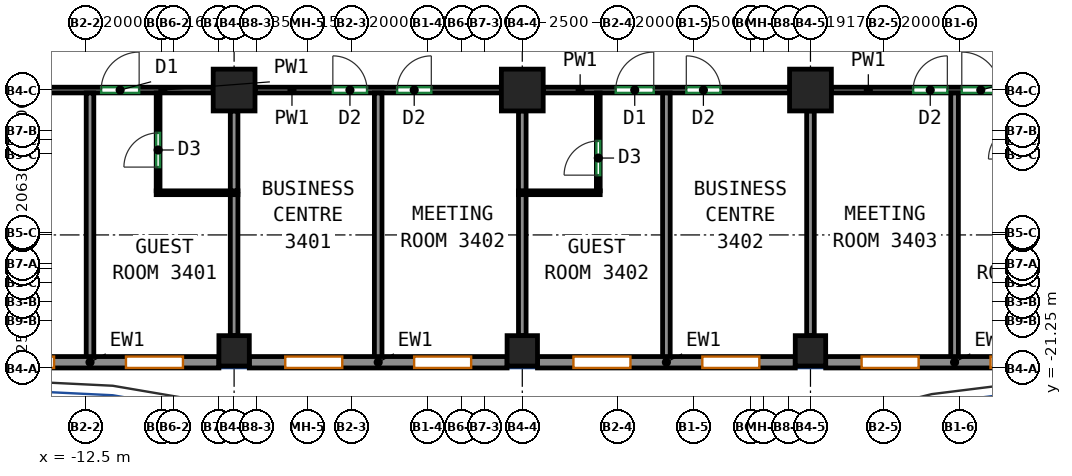
"""IFC4 building model, lengths in metres.
Left out: names, types, materials, properties, quantities, classifications, styles, units other than length and angle.
Written with IfcOpenShell. Run it as: python <this file> out.ifc"""

import sys

from ifc_helpers import new_model, si_unit, direction, frame, frame_2d, origin, origin_2d, place, context, subcontext, project, spatial, rectangle, extrude, source, transform, mapped, element, fill, save


model = new_model("IFC4")
c1 = context("Model", 3, precision=1e-05, world=origin(), true_north=direction((0.0, 1.0)))
c2 = subcontext(c1, "Body", "Model", "MODEL_VIEW")
j1 = project(units=[si_unit("LENGTHUNIT", "METRE"), si_unit("PLANEANGLEUNIT", "RADIAN")], contexts=[c1])
p1 = place(None, origin())
s1 = spatial("IfcSite", under=j1, at=p1, CompositionType="ELEMENT")
p2 = place(p1, origin())
s2 = spatial("IfcBuilding", under=s1, at=p2, CompositionType="ELEMENT")
p3 = place(p2, frame((0.0, 0.0, 150.7)))
s3 = spatial("IfcBuildingStorey", under=s2, at=p3, CompositionType="ELEMENT", Elevation=150.7)
m1 = source(origin(), c2, "Body", "SweptSolid", [
    extrude(rectangle(XDim=0.8, YDim=0.8, at=origin_2d()), origin(), (0.0, 0.0, 1.0), 3.12),
])
p4 = place(p3, frame((-8.583, -20.8, 0.0), z_axis=(0.0, 0.0, 1.0), x_axis=(1.0, 0.0, 0.0)))
e1 = element("IfcColumn", 1, at=p4, inside=s3, PredefinedType="COLUMN", context=c2, shape_type="MappedRepresentation", body=[
    mapped(m1, transform((0.0, 0.0, 0.0))),
])
m2 = source(origin(), c2, "Body", "SweptSolid", [
    extrude(rectangle(XDim=1.1, YDim=1.1, at=origin_2d()), origin(), (0.0, 0.0, 1.0), 3.12),
])
p5 = place(p3, frame((-8.583, -13.938, 0.0), z_axis=(0.0, 0.0, 1.0), x_axis=(1.0, 0.0, 0.0)))
e2 = element("IfcColumn", 2, at=p5, inside=s3, PredefinedType="COLUMN", context=c2, shape_type="MappedRepresentation", body=[
    mapped(m2, transform((0.0, 0.0, 0.0))),
])
p6 = place(p3, frame((-1.0, -20.8, 0.0), z_axis=(0.0, 0.0, 1.0), x_axis=(1.0, 0.0, 0.0)))
e3 = element("IfcColumn", 3, at=p6, inside=s3, PredefinedType="COLUMN", context=c2, shape_type="MappedRepresentation", body=[
    mapped(m1, transform((0.0, 0.0, 0.0))),
])
p7 = place(p3, frame((-1.0, -13.938, 0.0), z_axis=(0.0, 0.0, 1.0), x_axis=(1.0, 0.0, 0.0)))
e4 = element("IfcColumn", 4, at=p7, inside=s3, PredefinedType="COLUMN", context=c2, shape_type="MappedRepresentation", body=[
    mapped(m2, transform((0.0, 0.0, 0.0))),
])
p8 = place(p3, frame((6.583, -20.8, 0.0), z_axis=(0.0, 0.0, 1.0), x_axis=(1.0, 0.0, 0.0)))
e5 = element("IfcColumn", 5, at=p8, inside=s3, PredefinedType="COLUMN", context=c2, shape_type="MappedRepresentation", body=[
    mapped(m1, transform((0.0, 0.0, 0.0))),
])
p9 = place(p3, frame((6.583, -13.938, 0.0), z_axis=(0.0, 0.0, 1.0), x_axis=(1.0, 0.0, 0.0)))
e6 = element("IfcColumn", 6, at=p9, inside=s3, PredefinedType="COLUMN", context=c2, shape_type="MappedRepresentation", body=[
    mapped(m2, transform((0.0, 0.0, 0.0))),
])
m3 = source(origin(), c2, "Body", "SweptSolid", [
    extrude(rectangle(XDim=6.783, YDim=0.3, at=frame_2d((3.392, 0.0))), origin(), (0.0, 0.0, 1.0), 3.12),
])
p10 = place(p3, frame((-15.767, -21.1, 0.0), z_axis=(0.0, 0.0, 1.0), x_axis=(1.0, 0.0, 0.0)))
e7 = element("IfcWall", 7, at=p10, inside=s3, PredefinedType="SOLIDWALL", context=c2, shape_type="MappedRepresentation", body=[
    mapped(m3, transform((0.0, 0.0, 0.0))),
])
p11 = place(p10, frame((0.946, 0.0, 0.85)))
e8 = element("IfcOpeningElement", 8, at=p11, cuts=e7, PredefinedType="OPENING", context=c2, shape_type="SweptSolid", body=[
    extrude(rectangle(XDim=1.5, YDim=1.95, at=frame_2d((0.75, 0.975))), frame((0.0, 0.16, 0.0), z_axis=(0.0, -1.0, 0.0), x_axis=(1.0, 0.0, 0.0)), (0.0, 0.0, 1.0), 0.32),
])
p12 = place(p10, frame((4.338, 0.0, 0.85)))
e9 = element("IfcOpeningElement", 9, at=p12, cuts=e7, PredefinedType="OPENING", context=c2, shape_type="SweptSolid", body=[
    extrude(rectangle(XDim=1.5, YDim=1.95, at=frame_2d((0.75, 0.975))), frame((0.0, 0.16, 0.0), z_axis=(0.0, -1.0, 0.0), x_axis=(1.0, 0.0, 0.0)), (0.0, 0.0, 1.0), 0.32),
])
m4 = source(origin(), c2, "Body", "SweptSolid", [
    extrude(rectangle(XDim=6.783, YDim=0.3, at=frame_2d((3.392, 0.0))), origin(), (0.0, 0.0, 1.0), 3.12),
])
p13 = place(p3, frame((-8.183, -21.1, 0.0), z_axis=(0.0, 0.0, 1.0), x_axis=(1.0, 0.0, 0.0)))
e10 = element("IfcWall", 10, at=p13, inside=s3, PredefinedType="SOLIDWALL", context=c2, shape_type="MappedRepresentation", body=[
    mapped(m4, transform((0.0, 0.0, 0.0))),
])
p14 = place(p13, frame((0.946, 0.0, 0.85)))
e11 = element("IfcOpeningElement", 11, at=p14, cuts=e10, PredefinedType="OPENING", context=c2, shape_type="SweptSolid", body=[
    extrude(rectangle(XDim=1.5, YDim=1.95, at=frame_2d((0.75, 0.975))), frame((0.0, 0.16, 0.0), z_axis=(0.0, -1.0, 0.0), x_axis=(1.0, 0.0, 0.0)), (0.0, 0.0, 1.0), 0.32),
])
p15 = place(p13, frame((4.337, 0.0, 0.85)))
e12 = element("IfcOpeningElement", 12, at=p15, cuts=e10, PredefinedType="OPENING", context=c2, shape_type="SweptSolid", body=[
    extrude(rectangle(XDim=1.5, YDim=1.95, at=frame_2d((0.75, 0.975))), frame((0.0, 0.16, 0.0), z_axis=(0.0, -1.0, 0.0), x_axis=(1.0, 0.0, 0.0)), (0.0, 0.0, 1.0), 0.32),
])
p16 = place(p3, frame((-0.6, -21.1, 0.0), z_axis=(0.0, 0.0, 1.0), x_axis=(1.0, 0.0, 0.0)))
e13 = element("IfcWall", 13, at=p16, inside=s3, PredefinedType="SOLIDWALL", context=c2, shape_type="MappedRepresentation", body=[
    mapped(m4, transform((0.0, 0.0, 0.0))),
])
p17 = place(p16, frame((0.946, 0.0, 0.85)))
e14 = element("IfcOpeningElement", 14, at=p17, cuts=e13, PredefinedType="OPENING", context=c2, shape_type="SweptSolid", body=[
    extrude(rectangle(XDim=1.5, YDim=1.95, at=frame_2d((0.75, 0.975))), frame((0.0, 0.16, 0.0), z_axis=(0.0, -1.0, 0.0), x_axis=(1.0, 0.0, 0.0)), (0.0, 0.0, 1.0), 0.32),
])
p18 = place(p16, frame((4.337, 0.0, 0.85)))
e15 = element("IfcOpeningElement", 15, at=p18, cuts=e13, PredefinedType="OPENING", context=c2, shape_type="SweptSolid", body=[
    extrude(rectangle(XDim=1.5, YDim=1.95, at=frame_2d((0.75, 0.975))), frame((0.0, 0.16, 0.0), z_axis=(0.0, -1.0, 0.0), x_axis=(1.0, 0.0, 0.0)), (0.0, 0.0, 1.0), 0.32),
])
p19 = place(p3, frame((6.983, -21.1, 0.0), z_axis=(0.0, 0.0, 1.0), x_axis=(1.0, 0.0, 0.0)))
e16 = element("IfcWall", 16, at=p19, inside=s3, PredefinedType="SOLIDWALL", context=c2, shape_type="MappedRepresentation", body=[
    mapped(m3, transform((0.0, 0.0, 0.0))),
])
p20 = place(p19, frame((0.946, 0.0, 0.85)))
e17 = element("IfcOpeningElement", 17, at=p20, cuts=e16, PredefinedType="OPENING", context=c2, shape_type="SweptSolid", body=[
    extrude(rectangle(XDim=1.5, YDim=1.95, at=frame_2d((0.75, 0.975))), frame((0.0, 0.16, 0.0), z_axis=(0.0, -1.0, 0.0), x_axis=(1.0, 0.0, 0.0)), (0.0, 0.0, 1.0), 0.32),
])
p21 = place(p19, frame((4.338, 0.0, 0.85)))
e18 = element("IfcOpeningElement", 18, at=p21, cuts=e16, PredefinedType="OPENING", context=c2, shape_type="SweptSolid", body=[
    extrude(rectangle(XDim=1.5, YDim=1.95, at=frame_2d((0.75, 0.975))), frame((0.0, 0.16, 0.0), z_axis=(0.0, -1.0, 0.0), x_axis=(1.0, 0.0, 0.0)), (0.0, 0.0, 1.0), 0.32),
])
p22 = place(p3, frame((-13.55, -13.938, 0.0), z_axis=(0.0, 0.0, 1.0), x_axis=(1.0, 0.0, 0.0)))
e19 = element("IfcWall", 19, at=p22, inside=s3, PredefinedType="PARTITIONING", context=c2, shape_type="SweptSolid", body=[
    extrude(rectangle(XDim=4.417, YDim=0.15, at=frame_2d((2.208, 0.0))), origin(), (0.0, 0.0, 1.0), 3.12),
])
p23 = place(p22, frame((1.468, 0.0, 0.0)))
e20 = element("IfcOpeningElement", 20, at=p23, cuts=e19, PredefinedType="OPENING", context=c2, shape_type="SweptSolid", body=[
    extrude(rectangle(XDim=1.0, YDim=2.1, at=frame_2d((0.5, 1.05))), frame((0.0, 0.085, 0.0), z_axis=(0.0, -1.0, 0.0), x_axis=(1.0, 0.0, 0.0)), (0.0, 0.0, 1.0), 0.17),
])
p24 = place(p3, frame((-8.033, -13.938, 0.0), z_axis=(0.0, 0.0, 1.0), x_axis=(1.0, 0.0, 0.0)))
e21 = element("IfcWall", 21, at=p24, inside=s3, PredefinedType="PARTITIONING", context=c2, shape_type="SweptSolid", body=[
    extrude(rectangle(XDim=6.483, YDim=0.15, at=frame_2d((3.241, 0.0))), origin(), (0.0, 0.0, 1.0), 3.12),
])
p25 = place(p24, frame((2.048, 0.0, 0.0)))
e22 = element("IfcOpeningElement", 22, at=p25, cuts=e21, PredefinedType="OPENING", context=c2, shape_type="SweptSolid", body=[
    extrude(rectangle(XDim=0.9, YDim=2.1, at=frame_2d((0.45, 1.05))), frame((0.0, 0.085, 0.0), z_axis=(0.0, -1.0, 0.0), x_axis=(1.0, 0.0, 0.0)), (0.0, 0.0, 1.0), 0.17),
])
p26 = place(p24, frame((3.739, 0.0, 0.0)))
e23 = element("IfcOpeningElement", 23, at=p26, cuts=e21, PredefinedType="OPENING", context=c2, shape_type="SweptSolid", body=[
    extrude(rectangle(XDim=0.9, YDim=2.1, at=frame_2d((0.45, 1.05))), frame((0.0, 0.085, 0.0), z_axis=(0.0, -1.0, 0.0), x_axis=(1.0, 0.0, 0.0)), (0.0, 0.0, 1.0), 0.17),
])
p27 = place(p3, frame((-0.45, -13.938, 0.0), z_axis=(0.0, 0.0, 1.0), x_axis=(1.0, 0.0, 0.0)))
e24 = element("IfcWall", 24, at=p27, inside=s3, PredefinedType="PARTITIONING", context=c2, shape_type="SweptSolid", body=[
    extrude(rectangle(XDim=6.483, YDim=0.15, at=frame_2d((3.241, 0.0))), origin(), (0.0, 0.0, 1.0), 3.12),
])
p28 = place(p27, frame((1.909, 0.0, 0.0)))
e25 = element("IfcOpeningElement", 25, at=p28, cuts=e24, PredefinedType="OPENING", context=c2, shape_type="SweptSolid", body=[
    extrude(rectangle(XDim=1.0, YDim=2.1, at=frame_2d((0.5, 1.05))), frame((0.0, 0.085, 0.0), z_axis=(0.0, -1.0, 0.0), x_axis=(1.0, 0.0, 0.0)), (0.0, 0.0, 1.0), 0.17),
])
p29 = place(p27, frame((3.766, 0.0, 0.0)))
e26 = element("IfcOpeningElement", 26, at=p29, cuts=e24, PredefinedType="OPENING", context=c2, shape_type="SweptSolid", body=[
    extrude(rectangle(XDim=0.9, YDim=2.1, at=frame_2d((0.45, 1.05))), frame((0.0, 0.085, 0.0), z_axis=(0.0, -1.0, 0.0), x_axis=(1.0, 0.0, 0.0)), (0.0, 0.0, 1.0), 0.17),
])
p30 = place(p3, frame((7.133, -13.938, 0.0), z_axis=(0.0, 0.0, 1.0), x_axis=(1.0, 0.0, 0.0)))
e27 = element("IfcWall", 27, at=p30, inside=s3, PredefinedType="PARTITIONING", context=c2, shape_type="SweptSolid", body=[
    extrude(rectangle(XDim=6.484, YDim=0.15, at=frame_2d((3.242, 0.0))), origin(), (0.0, 0.0, 1.0), 3.12),
])
p31 = place(p30, frame((2.152, 0.0, 0.0)))
e28 = element("IfcOpeningElement", 28, at=p31, cuts=e27, PredefinedType="OPENING", context=c2, shape_type="SweptSolid", body=[
    extrude(rectangle(XDim=0.9, YDim=2.1, at=frame_2d((0.45, 1.05))), frame((0.0, 0.085, 0.0), z_axis=(0.0, -1.0, 0.0), x_axis=(1.0, 0.0, 0.0)), (0.0, 0.0, 1.0), 0.17),
])
p32 = place(p30, frame((3.432, 0.0, 0.0)))
e29 = element("IfcOpeningElement", 29, at=p32, cuts=e27, PredefinedType="OPENING", context=c2, shape_type="SweptSolid", body=[
    extrude(rectangle(XDim=1.0, YDim=2.1, at=frame_2d((0.5, 1.05))), frame((0.0, 0.085, 0.0), z_axis=(0.0, -1.0, 0.0), x_axis=(1.0, 0.0, 0.0)), (0.0, 0.0, 1.0), 0.17),
])
p33 = place(p3, frame((-12.375, -21.0, 0.0), z_axis=(0.0, 0.0, 1.0), x_axis=(0.0, 1.0, 0.0)))
e30 = element("IfcWall", 30, at=p33, inside=s3, PredefinedType="PARTITIONING", context=c2, shape_type="SweptSolid", body=[
    extrude(rectangle(XDim=6.985, YDim=0.2, at=frame_2d((3.493, 0.0))), origin(), (0.0, 0.0, 1.0), 3.12),
])
p34 = place(p3, frame((-10.583, -16.59, 0.0), z_axis=(0.0, 0.0, 1.0), x_axis=(0.0, 1.0, 0.0)))
e31 = element("IfcWall", 31, at=p34, inside=s3, PredefinedType="PARTITIONING", context=c2, shape_type="SweptSolid", body=[
    extrude(rectangle(XDim=2.575, YDim=0.1, at=frame_2d((1.288, 0.0))), origin(), (0.0, 0.0, 1.0), 3.12),
])
p35 = place(p34, frame((0.625, 0.0, 0.0)))
e32 = element("IfcOpeningElement", 32, at=p35, cuts=e31, PredefinedType="OPENING", context=c2, shape_type="SweptSolid", body=[
    extrude(rectangle(XDim=0.9, YDim=2.1, at=frame_2d((0.45, 1.05))), frame((0.0, 0.06, 0.0), z_axis=(0.0, -1.0, 0.0), x_axis=(1.0, 0.0, 0.0)), (0.0, 0.0, 1.0), 0.12),
])
p36 = place(p3, frame((-10.633, -16.64, 0.0), z_axis=(0.0, 0.0, 1.0), x_axis=(1.0, 0.0, 0.0)))
e33 = element("IfcWall", 33, at=p36, inside=s3, PredefinedType="PARTITIONING", context=c2, shape_type="SweptSolid", body=[
    extrude(rectangle(XDim=2.15, YDim=0.1, at=frame_2d((1.075, 0.0))), origin(), (0.0, 0.0, 1.0), 3.12),
])
p37 = place(p3, frame((-8.583, -20.4, 0.0), z_axis=(0.0, 0.0, 1.0), x_axis=(0.0, 1.0, 0.0)))
e34 = element("IfcWall", 34, at=p37, inside=s3, PredefinedType="PARTITIONING", context=c2, shape_type="SweptSolid", body=[
    extrude(rectangle(XDim=3.71, YDim=0.2, at=frame_2d((1.855, 0.0))), origin(), (0.0, 0.0, 1.0), 3.12),
])
p38 = place(p3, frame((-8.583, -16.59, 0.0), z_axis=(0.0, 0.0, 1.0), x_axis=(0.0, 1.0, 0.0)))
e35 = element("IfcWall", 35, at=p38, inside=s3, PredefinedType="PARTITIONING", context=c2, shape_type="SweptSolid", body=[
    extrude(rectangle(XDim=2.102, YDim=0.2, at=frame_2d((1.051, 0.0))), origin(), (0.0, 0.0, 1.0), 3.12),
])
p39 = place(p3, frame((-4.792, -21.0, 0.0), z_axis=(0.0, 0.0, 1.0), x_axis=(0.0, 1.0, 0.0)))
e36 = element("IfcWall", 36, at=p39, inside=s3, PredefinedType="PARTITIONING", context=c2, shape_type="SweptSolid", body=[
    extrude(rectangle(XDim=6.985, YDim=0.2, at=frame_2d((3.493, 0.0))), origin(), (0.0, 0.0, 1.0), 3.12),
])
p40 = place(p3, frame((-1.0, -20.4, 0.0), z_axis=(0.0, 0.0, 1.0), x_axis=(0.0, 1.0, 0.0)))
e37 = element("IfcWall", 37, at=p40, inside=s3, PredefinedType="PARTITIONING", context=c2, shape_type="SweptSolid", body=[
    extrude(rectangle(XDim=3.72, YDim=0.2, at=frame_2d((1.86, 0.0))), origin(), (0.0, 0.0, 1.0), 3.12),
])
p41 = place(p3, frame((-1.0, -16.6, 0.0), z_axis=(0.0, 0.0, 1.0), x_axis=(0.0, 1.0, 0.0)))
e38 = element("IfcWall", 38, at=p41, inside=s3, PredefinedType="PARTITIONING", context=c2, shape_type="SweptSolid", body=[
    extrude(rectangle(XDim=2.112, YDim=0.2, at=frame_2d((1.056, 0.0))), origin(), (0.0, 0.0, 1.0), 3.12),
])
p42 = place(p3, frame((1.0, -16.59, 0.0), z_axis=(0.0, 0.0, 1.0), x_axis=(0.0, 1.0, 0.0)))
e39 = element("IfcWall", 39, at=p42, inside=s3, PredefinedType="PARTITIONING", context=c2, shape_type="SweptSolid", body=[
    extrude(rectangle(XDim=2.575, YDim=0.1, at=frame_2d((1.288, 0.0))), origin(), (0.0, 0.0, 1.0), 3.12),
])
p43 = place(p42, frame((0.413, 0.0, 0.0)))
e40 = element("IfcOpeningElement", 40, at=p43, cuts=e39, PredefinedType="OPENING", context=c2, shape_type="SweptSolid", body=[
    extrude(rectangle(XDim=0.9, YDim=2.1, at=frame_2d((0.45, 1.05))), frame((0.0, 0.06, 0.0), z_axis=(0.0, -1.0, 0.0), x_axis=(1.0, 0.0, 0.0)), (0.0, 0.0, 1.0), 0.12),
])
p44 = place(p3, frame((-1.1, -16.64, 0.0), z_axis=(0.0, 0.0, 1.0), x_axis=(1.0, 0.0, 0.0)))
e41 = element("IfcWall", 41, at=p44, inside=s3, PredefinedType="PARTITIONING", context=c2, shape_type="SweptSolid", body=[
    extrude(rectangle(XDim=2.15, YDim=0.1, at=frame_2d((1.075, 0.0))), origin(), (0.0, 0.0, 1.0), 3.12),
])
p45 = place(p3, frame((2.792, -21.0, 0.0), z_axis=(0.0, 0.0, 1.0), x_axis=(0.0, 1.0, 0.0)))
e42 = element("IfcWall", 42, at=p45, inside=s3, PredefinedType="PARTITIONING", context=c2, shape_type="SweptSolid", body=[
    extrude(rectangle(XDim=6.985, YDim=0.2, at=frame_2d((3.493, 0.0))), origin(), (0.0, 0.0, 1.0), 3.12),
])
p46 = place(p3, frame((6.583, -20.4, 0.0), z_axis=(0.0, 0.0, 1.0), x_axis=(0.0, 1.0, 0.0)))
e43 = element("IfcWall", 43, at=p46, inside=s3, PredefinedType="PARTITIONING", context=c2, shape_type="SweptSolid", body=[
    extrude(rectangle(XDim=5.912, YDim=0.2, at=frame_2d((2.956, 0.0))), origin(), (0.0, 0.0, 1.0), 3.12),
])
p47 = place(p3, frame((10.375, -21.0, 0.0), z_axis=(0.0, 0.0, 1.0), x_axis=(0.0, 1.0, 0.0)))
e44 = element("IfcWall", 44, at=p47, inside=s3, PredefinedType="PARTITIONING", context=c2, shape_type="SweptSolid", body=[
    extrude(rectangle(XDim=6.985, YDim=0.2, at=frame_2d((3.493, 0.0))), origin(), (0.0, 0.0, 1.0), 3.12),
])
p48 = place(p11, origin())
e45 = element("IfcWindow", 45, at=p48, inside=s3, PartitioningType="SINGLE_PANEL", PredefinedType="WINDOW", context=c2, shape_type="SweptSolid", body=[
    extrude(rectangle(XDim=1.5, YDim=1.95, at=frame_2d((0.75, 0.975))), frame((0.0, 0.03, 0.0), z_axis=(0.0, -1.0, 0.0), x_axis=(1.0, 0.0, 0.0)), (0.0, 0.0, 1.0), 0.06),
])
fill(e8, e45)
p49 = place(p12, origin())
e46 = element("IfcWindow", 46, at=p49, inside=s3, PartitioningType="SINGLE_PANEL", PredefinedType="WINDOW", context=c2, shape_type="SweptSolid", body=[
    extrude(rectangle(XDim=1.5, YDim=1.95, at=frame_2d((0.75, 0.975))), frame((0.0, 0.03, 0.0), z_axis=(0.0, -1.0, 0.0), x_axis=(1.0, 0.0, 0.0)), (0.0, 0.0, 1.0), 0.06),
])
fill(e9, e46)
p50 = place(p14, origin())
e47 = element("IfcWindow", 47, at=p50, inside=s3, PartitioningType="SINGLE_PANEL", PredefinedType="WINDOW", context=c2, shape_type="SweptSolid", body=[
    extrude(rectangle(XDim=1.5, YDim=1.95, at=frame_2d((0.75, 0.975))), frame((0.0, 0.03, 0.0), z_axis=(0.0, -1.0, 0.0), x_axis=(1.0, 0.0, 0.0)), (0.0, 0.0, 1.0), 0.06),
])
fill(e11, e47)
p51 = place(p15, origin())
e48 = element("IfcWindow", 48, at=p51, inside=s3, PartitioningType="SINGLE_PANEL", PredefinedType="WINDOW", context=c2, shape_type="SweptSolid", body=[
    extrude(rectangle(XDim=1.5, YDim=1.95, at=frame_2d((0.75, 0.975))), frame((0.0, 0.03, 0.0), z_axis=(0.0, -1.0, 0.0), x_axis=(1.0, 0.0, 0.0)), (0.0, 0.0, 1.0), 0.06),
])
fill(e12, e48)
p52 = place(p17, origin())
e49 = element("IfcWindow", 49, at=p52, inside=s3, PartitioningType="SINGLE_PANEL", PredefinedType="WINDOW", context=c2, shape_type="SweptSolid", body=[
    extrude(rectangle(XDim=1.5, YDim=1.95, at=frame_2d((0.75, 0.975))), frame((0.0, 0.03, 0.0), z_axis=(0.0, -1.0, 0.0), x_axis=(1.0, 0.0, 0.0)), (0.0, 0.0, 1.0), 0.06),
])
fill(e14, e49)
p53 = place(p18, origin())
e50 = element("IfcWindow", 50, at=p53, inside=s3, PartitioningType="SINGLE_PANEL", PredefinedType="WINDOW", context=c2, shape_type="SweptSolid", body=[
    extrude(rectangle(XDim=1.5, YDim=1.95, at=frame_2d((0.75, 0.975))), frame((0.0, 0.03, 0.0), z_axis=(0.0, -1.0, 0.0), x_axis=(1.0, 0.0, 0.0)), (0.0, 0.0, 1.0), 0.06),
])
fill(e15, e50)
p54 = place(p20, origin())
e51 = element("IfcWindow", 51, at=p54, inside=s3, PartitioningType="SINGLE_PANEL", PredefinedType="WINDOW", context=c2, shape_type="SweptSolid", body=[
    extrude(rectangle(XDim=1.5, YDim=1.95, at=frame_2d((0.75, 0.975))), frame((0.0, 0.03, 0.0), z_axis=(0.0, -1.0, 0.0), x_axis=(1.0, 0.0, 0.0)), (0.0, 0.0, 1.0), 0.06),
])
fill(e17, e51)
p55 = place(p21, origin())
e52 = element("IfcWindow", 52, at=p55, inside=s3, PartitioningType="SINGLE_PANEL", PredefinedType="WINDOW", context=c2, shape_type="SweptSolid", body=[
    extrude(rectangle(XDim=1.5, YDim=1.95, at=frame_2d((0.75, 0.975))), frame((0.0, 0.03, 0.0), z_axis=(0.0, -1.0, 0.0), x_axis=(1.0, 0.0, 0.0)), (0.0, 0.0, 1.0), 0.06),
])
fill(e18, e52)
p56 = place(p43, origin())
e53 = element("IfcDoor", 53, at=p56, inside=s3, OperationType="SINGLE_SWING_LEFT", PredefinedType="DOOR", context=c2, shape_type="SweptSolid", body=[
    extrude(rectangle(XDim=0.9, YDim=2.1, at=frame_2d((0.45, 1.05))), frame((0.0, 0.025, 0.0), z_axis=(0.0, -1.0, 0.0), x_axis=(1.0, 0.0, 0.0)), (0.0, 0.0, 1.0), 0.05),
])
fill(e40, e53)
p57 = place(p35, origin())
e54 = element("IfcDoor", 54, at=p57, inside=s3, OperationType="SINGLE_SWING_LEFT", PredefinedType="DOOR", context=c2, shape_type="SweptSolid", body=[
    extrude(rectangle(XDim=0.9, YDim=2.1, at=frame_2d((0.45, 1.05))), frame((0.0, 0.025, 0.0), z_axis=(0.0, -1.0, 0.0), x_axis=(1.0, 0.0, 0.0)), (0.0, 0.0, 1.0), 0.05),
])
fill(e32, e54)
p58 = place(p23, origin())
e55 = element("IfcDoor", 55, at=p58, inside=s3, OperationType="SINGLE_SWING_RIGHT", PredefinedType="DOOR", context=c2, shape_type="SweptSolid", body=[
    extrude(rectangle(XDim=1.0, YDim=2.1, at=frame_2d((0.5, 1.05))), frame((0.0, 0.025, 0.0), z_axis=(0.0, -1.0, 0.0), x_axis=(1.0, 0.0, 0.0)), (0.0, 0.0, 1.0), 0.05),
])
fill(e20, e55)
p59 = place(p25, origin())
e56 = element("IfcDoor", 56, at=p59, inside=s3, OperationType="SINGLE_SWING_LEFT", PredefinedType="DOOR", context=c2, shape_type="SweptSolid", body=[
    extrude(rectangle(XDim=0.9, YDim=2.1, at=frame_2d((0.45, 1.05))), frame((0.0, 0.025, 0.0), z_axis=(0.0, -1.0, 0.0), x_axis=(1.0, 0.0, 0.0)), (0.0, 0.0, 1.0), 0.05),
])
fill(e22, e56)
p60 = place(p26, origin())
e57 = element("IfcDoor", 57, at=p60, inside=s3, OperationType="SINGLE_SWING_RIGHT", PredefinedType="DOOR", context=c2, shape_type="SweptSolid", body=[
    extrude(rectangle(XDim=0.9, YDim=2.1, at=frame_2d((0.45, 1.05))), frame((0.0, 0.025, 0.0), z_axis=(0.0, -1.0, 0.0), x_axis=(1.0, 0.0, 0.0)), (0.0, 0.0, 1.0), 0.05),
])
fill(e23, e57)
p61 = place(p28, origin())
e58 = element("IfcDoor", 58, at=p61, inside=s3, OperationType="SINGLE_SWING_RIGHT", PredefinedType="DOOR", context=c2, shape_type="SweptSolid", body=[
    extrude(rectangle(XDim=1.0, YDim=2.1, at=frame_2d((0.5, 1.05))), frame((0.0, 0.025, 0.0), z_axis=(0.0, -1.0, 0.0), x_axis=(1.0, 0.0, 0.0)), (0.0, 0.0, 1.0), 0.05),
])
fill(e25, e58)
p62 = place(p29, origin())
e59 = element("IfcDoor", 59, at=p62, inside=s3, OperationType="SINGLE_SWING_LEFT", PredefinedType="DOOR", context=c2, shape_type="SweptSolid", body=[
    extrude(rectangle(XDim=0.9, YDim=2.1, at=frame_2d((0.45, 1.05))), frame((0.0, 0.025, 0.0), z_axis=(0.0, -1.0, 0.0), x_axis=(1.0, 0.0, 0.0)), (0.0, 0.0, 1.0), 0.05),
])
fill(e26, e59)
p63 = place(p31, origin())
e60 = element("IfcDoor", 60, at=p63, inside=s3, OperationType="SINGLE_SWING_RIGHT", PredefinedType="DOOR", context=c2, shape_type="SweptSolid", body=[
    extrude(rectangle(XDim=0.9, YDim=2.1, at=frame_2d((0.45, 1.05))), frame((0.0, 0.025, 0.0), z_axis=(0.0, -1.0, 0.0), x_axis=(1.0, 0.0, 0.0)), (0.0, 0.0, 1.0), 0.05),
])
fill(e28, e60)
p64 = place(p32, origin())
e61 = element("IfcDoor", 61, at=p64, inside=s3, OperationType="SINGLE_SWING_LEFT", PredefinedType="DOOR", context=c2, shape_type="SweptSolid", body=[
    extrude(rectangle(XDim=1.0, YDim=2.1, at=frame_2d((0.5, 1.05))), frame((0.0, 0.025, 0.0), z_axis=(0.0, -1.0, 0.0), x_axis=(1.0, 0.0, 0.0)), (0.0, 0.0, 1.0), 0.05),
])
fill(e29, e61)
save(model, sys.argv[1])
